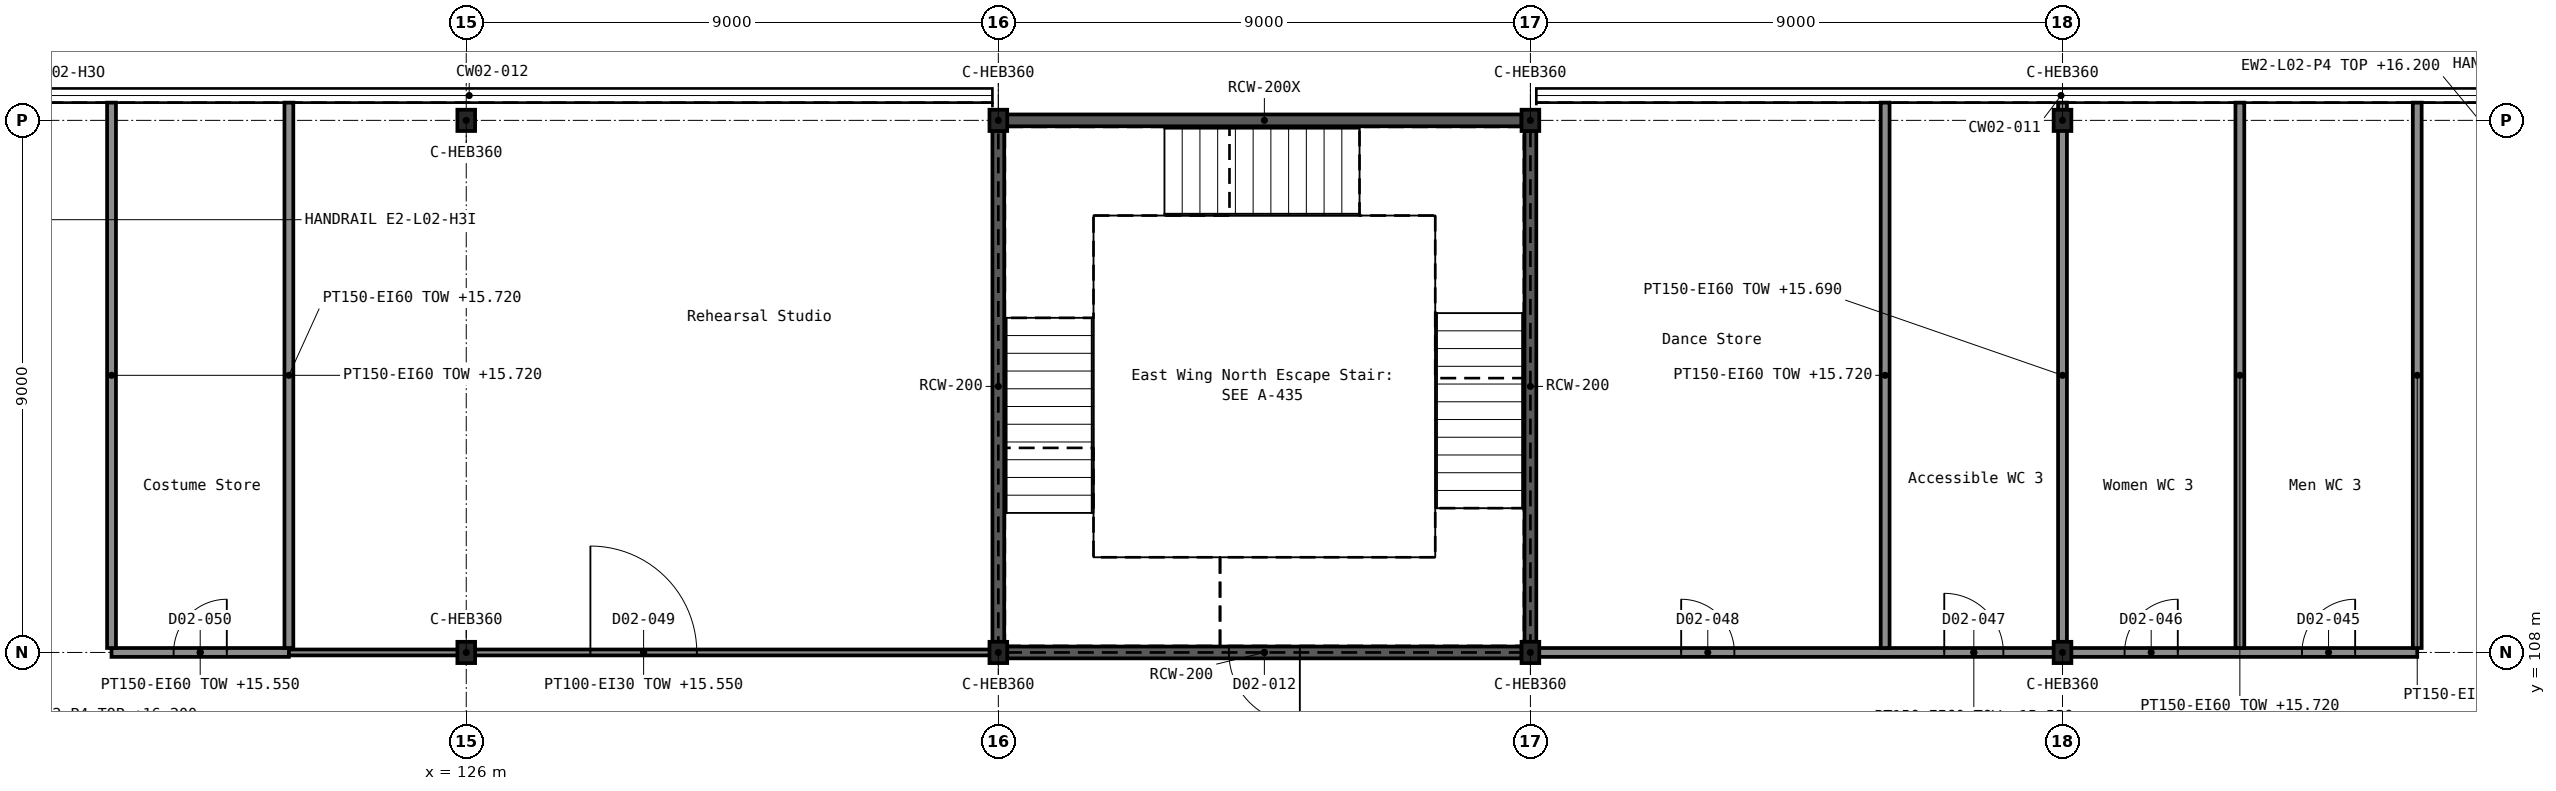
"""IFC4 building model, lengths in metres.
Left out: names, types, materials, properties, quantities, classifications, styles, units other than length and angle.
Written with IfcOpenShell. Run it as: python <this file> out.ifc"""

import sys

from ifc_helpers import new_model, si_unit, direction, frame, frame_2d, origin, origin_2d, place, context, subcontext, project, spatial, rectangle, i_section, extrude, element, fill, save


model = new_model("IFC4")
c1 = context("Model", 3, precision=1e-05, world=origin(), true_north=direction((0.0, 1.0)))
c2 = subcontext(c1, "Body", "Model", "MODEL_VIEW")
j1 = project(units=[si_unit("LENGTHUNIT", "METRE"), si_unit("PLANEANGLEUNIT", "RADIAN")], contexts=[c1])
p1 = place(None, origin())
s1 = spatial("IfcSite", under=j1, at=p1, CompositionType="ELEMENT")
p2 = place(p1, origin())
s2 = spatial("IfcBuilding", under=s1, at=p2, CompositionType="ELEMENT")
p3 = place(p2, frame((0.0, 0.0, 10.8)))
s3 = spatial("IfcBuildingStorey", under=s2, at=p3, CompositionType="ELEMENT", Elevation=10.8)
for number, where, z_axis, x_axis in (
    (1, (126.0, 108.0, 0.0), (0.0, 0.0, 1.0), (1.0, 0.0, 0.0)),
    (2, (135.0, 108.0, 0.0), (0.0, 0.0, 1.0), (1.0, 0.0, 0.0)),
    (3, (144.0, 108.0, 0.0), (0.0, 0.0, 1.0), (1.0, 0.0, 0.0)),
    (4, (153.0, 108.0, 0.0), (0.0, 0.0, 1.0), (1.0, 0.0, 0.0)),
    (5, (126.0, 117.0, 0.0), (0.0, 0.0, 1.0), (1.0, 0.0, 0.0)),
    (6, (135.0, 117.0, 0.0), (0.0, 0.0, 1.0), (1.0, 0.0, 0.0)),
    (7, (144.0, 117.0, 0.0), (0.0, 0.0, 1.0), (1.0, 0.0, 0.0)),
    (8, (153.0, 117.0, 0.0), (0.0, 0.0, 1.0), (1.0, 0.0, 0.0)),
):
    element("IfcColumn", number, at=place(p3, frame(where, z_axis=z_axis, x_axis=x_axis)), inside=s3, PredefinedType="COLUMN", context=c2, shape_type="SweptSolid", body=[
        extrude(i_section(OverallWidth=0.3, OverallDepth=0.36, WebThickness=0.012, FlangeThickness=0.022, FilletRadius=0.027, at=origin_2d()), origin(), (0.0, 0.0, 1.0), 5.4),
    ])
p4 = place(p3, frame((135.15, 108.0, 0.0), z_axis=(0.0, 0.0, 1.0), x_axis=(1.0, 0.0, 0.0)))
e9 = element("IfcWall", 9, at=p4, inside=s3, PredefinedType="SHEAR", context=c2, shape_type="SweptSolid", body=[
    extrude(rectangle(XDim=8.7, YDim=0.2, at=frame_2d((4.35, 0.0))), origin(), (0.0, 0.0, 1.0), 5.4),
])
p5 = place(p4, frame((3.75, 0.0, 0.0)))
e10 = element("IfcOpeningElement", 10, at=p5, cuts=e9, PredefinedType="OPENING", context=c2, shape_type="SweptSolid", body=[
    extrude(rectangle(XDim=1.2, YDim=2.1, at=frame_2d((0.6, 1.05))), frame((0.0, 0.111, 0.0), z_axis=(0.0, -1.0, 0.0), x_axis=(1.0, 0.0, 0.0)), (0.0, 0.0, 1.0), 0.222),
])
p6 = place(p3, frame((135.15, 117.0, 0.0), z_axis=(0.0, 0.0, 1.0), x_axis=(1.0, 0.0, 0.0)))
e11 = element("IfcWall", 11, at=p6, inside=s3, PredefinedType="SHEAR", context=c2, shape_type="SweptSolid", body=[
    extrude(rectangle(XDim=8.7, YDim=0.2, at=frame_2d((4.35, 0.0))), origin(), (0.0, 0.0, 1.0), 5.4),
])
for number, where, z_axis, x_axis in (
    (12, (135.0, 108.18, 0.0), (0.0, 0.0, 1.0), (0.0, 1.0, 0.0)),
    (13, (144.0, 108.18, 0.0), (0.0, 0.0, 1.0), (0.0, 1.0, 0.0)),
):
    element("IfcWall", number, at=place(p3, frame(where, z_axis=z_axis, x_axis=x_axis)), inside=s3, PredefinedType="SHEAR", context=c2, shape_type="SweptSolid", body=[
        extrude(rectangle(XDim=8.64, YDim=0.2, at=frame_2d((4.32, 0.0))), origin(), (0.0, 0.0, 1.0), 5.4),
    ])
p7 = place(p3, frame((120.0, 108.0, 0.0), z_axis=(0.0, 0.0, 1.0), x_axis=(1.0, 0.0, 0.0)))
e14 = element("IfcWall", 14, at=p7, inside=s3, PredefinedType="PARTITIONING", context=c2, shape_type="SweptSolid", body=[
    extrude(rectangle(XDim=3.0, YDim=0.15, at=frame_2d((1.5, 0.0))), origin(), (0.0, 0.0, 1.0), 4.75),
])
p8 = place(p7, frame((1.05, 0.0, 0.0)))
e15 = element("IfcOpeningElement", 15, at=p8, cuts=e14, PredefinedType="OPENING", context=c2, shape_type="SweptSolid", body=[
    extrude(rectangle(XDim=0.9, YDim=2.4, at=frame_2d((0.45, 1.2))), frame((0.0, 0.086, 0.0), z_axis=(0.0, -1.0, 0.0), x_axis=(1.0, 0.0, 0.0)), (0.0, 0.0, 1.0), 0.172),
])
p9 = place(p3, frame((144.0, 108.0, 0.0), z_axis=(0.0, 0.0, 1.0), x_axis=(1.0, 0.0, 0.0)))
e16 = element("IfcWall", 16, at=p9, inside=s3, PredefinedType="PARTITIONING", context=c2, shape_type="SweptSolid", body=[
    extrude(rectangle(XDim=15.0, YDim=0.15, at=frame_2d((7.5, 0.0))), origin(), (0.0, 0.0, 1.0), 4.75),
])
p10 = place(p9, frame((13.05, 0.0, 0.0)))
e17 = element("IfcOpeningElement", 17, at=p10, cuts=e16, PredefinedType="OPENING", context=c2, shape_type="SweptSolid", body=[
    extrude(rectangle(XDim=0.9, YDim=2.1, at=frame_2d((0.45, 1.05))), frame((0.0, 0.086, 0.0), z_axis=(0.0, -1.0, 0.0), x_axis=(1.0, 0.0, 0.0)), (0.0, 0.0, 1.0), 0.172),
])
p11 = place(p9, frame((10.05, 0.0, 0.0)))
e18 = element("IfcOpeningElement", 18, at=p11, cuts=e16, PredefinedType="OPENING", context=c2, shape_type="SweptSolid", body=[
    extrude(rectangle(XDim=0.9, YDim=2.1, at=frame_2d((0.45, 1.05))), frame((0.0, 0.086, 0.0), z_axis=(0.0, -1.0, 0.0), x_axis=(1.0, 0.0, 0.0)), (0.0, 0.0, 1.0), 0.172),
])
p12 = place(p9, frame((7.0, 0.0, 0.0)))
e19 = element("IfcOpeningElement", 19, at=p12, cuts=e16, PredefinedType="OPENING", context=c2, shape_type="SweptSolid", body=[
    extrude(rectangle(XDim=1.0, YDim=2.1, at=frame_2d((0.5, 1.05))), frame((0.0, 0.086, 0.0), z_axis=(0.0, -1.0, 0.0), x_axis=(1.0, 0.0, 0.0)), (0.0, 0.0, 1.0), 0.172),
])
p13 = place(p9, frame((2.55, 0.0, 0.0)))
e20 = element("IfcOpeningElement", 20, at=p13, cuts=e16, PredefinedType="OPENING", context=c2, shape_type="SweptSolid", body=[
    extrude(rectangle(XDim=0.9, YDim=2.4, at=frame_2d((0.45, 1.2))), frame((0.0, 0.086, 0.0), z_axis=(0.0, -1.0, 0.0), x_axis=(1.0, 0.0, 0.0)), (0.0, 0.0, 1.0), 0.172),
])
for number, where, z_axis, x_axis in (
    (21, (120.0, 108.075, 0.0), (0.0, 0.0, 1.0), (0.0, 1.0, 0.0)),
    (22, (123.0, 108.075, 0.0), (0.0, 0.0, 1.0), (0.0, 1.0, 0.0)),
    (23, (150.0, 108.075, 0.0), (0.0, 0.0, 1.0), (0.0, 1.0, 0.0)),
):
    element("IfcWall", number, at=place(p3, frame(where, z_axis=z_axis, x_axis=x_axis)), inside=s3, PredefinedType="PARTITIONING", context=c2, shape_type="SweptSolid", body=[
        extrude(rectangle(XDim=9.225, YDim=0.15, at=frame_2d((4.613, 0.0))), origin(), (0.0, 0.0, 1.0), 4.92),
    ])
p14 = place(p3, frame((153.0, 108.075, 0.0), z_axis=(0.0, 0.0, 1.0), x_axis=(0.0, 1.0, 0.0)))
e24 = element("IfcWall", 24, at=p14, inside=s3, PredefinedType="PARTITIONING", context=c2, shape_type="SweptSolid", body=[
    extrude(rectangle(XDim=9.225, YDim=0.15, at=frame_2d((4.613, 0.0))), origin(), (0.0, 0.0, 1.0), 4.89),
])
for number, where, z_axis, x_axis in (
    (25, (156.0, 108.075, 0.0), (0.0, 0.0, 1.0), (0.0, 1.0, 0.0)),
    (26, (159.0, 108.075, 0.0), (0.0, 0.0, 1.0), (0.0, 1.0, 0.0)),
):
    element("IfcWall", number, at=place(p3, frame(where, z_axis=z_axis, x_axis=x_axis)), inside=s3, PredefinedType="PARTITIONING", context=c2, shape_type="SweptSolid", body=[
        extrude(rectangle(XDim=9.225, YDim=0.15, at=frame_2d((4.613, 0.0))), origin(), (0.0, 0.0, 1.0), 4.92),
    ])
p15 = place(p3, frame((123.0, 108.0, 0.0), z_axis=(0.0, 0.0, 1.0), x_axis=(1.0, 0.0, 0.0)))
e27 = element("IfcWall", 27, at=p15, inside=s3, PredefinedType="PARTITIONING", context=c2, shape_type="SweptSolid", body=[
    extrude(rectangle(XDim=12.0, YDim=0.1, at=frame_2d((6.0, 0.0))), origin(), (0.0, 0.0, 1.0), 4.75),
])
p16 = place(p15, frame((5.1, 0.0, 0.0)))
e28 = element("IfcOpeningElement", 28, at=p16, cuts=e27, PredefinedType="OPENING", context=c2, shape_type="SweptSolid", body=[
    extrude(rectangle(XDim=1.8, YDim=2.1, at=frame_2d((0.9, 1.05))), frame((0.0, 0.061, 0.0), z_axis=(0.0, -1.0, 0.0), x_axis=(1.0, 0.0, 0.0)), (0.0, 0.0, 1.0), 0.122),
])
p17 = place(p5, frame((1.2, 0.0, 0.0), z_axis=(0.0, 0.0, 1.0), x_axis=(-1.0, 0.0, 0.0)))
e29 = element("IfcDoor", 29, at=p17, inside=s3, OperationType="SINGLE_SWING_LEFT", PredefinedType="DOOR", context=c2, shape_type="SweptSolid", body=[
    extrude(rectangle(XDim=1.2, YDim=2.1, at=frame_2d((0.6, 1.05))), frame((0.0, 0.025, 0.0), z_axis=(0.0, -1.0, 0.0), x_axis=(1.0, 0.0, 0.0)), (0.0, 0.0, 1.0), 0.05),
])
fill(e10, e29)
p18 = place(p10, origin())
e30 = element("IfcDoor", 30, at=p18, inside=s3, OperationType="SINGLE_SWING_RIGHT", PredefinedType="DOOR", context=c2, shape_type="SweptSolid", body=[
    extrude(rectangle(XDim=0.9, YDim=2.1, at=frame_2d((0.45, 1.05))), frame((0.0, 0.025, 0.0), z_axis=(0.0, -1.0, 0.0), x_axis=(1.0, 0.0, 0.0)), (0.0, 0.0, 1.0), 0.05),
])
fill(e17, e30)
p19 = place(p11, origin())
e31 = element("IfcDoor", 31, at=p19, inside=s3, OperationType="SINGLE_SWING_RIGHT", PredefinedType="DOOR", context=c2, shape_type="SweptSolid", body=[
    extrude(rectangle(XDim=0.9, YDim=2.1, at=frame_2d((0.45, 1.05))), frame((0.0, 0.025, 0.0), z_axis=(0.0, -1.0, 0.0), x_axis=(1.0, 0.0, 0.0)), (0.0, 0.0, 1.0), 0.05),
])
fill(e18, e31)
p20 = place(p12, origin())
e32 = element("IfcDoor", 32, at=p20, inside=s3, OperationType="SINGLE_SWING_LEFT", PredefinedType="DOOR", context=c2, shape_type="SweptSolid", body=[
    extrude(rectangle(XDim=1.0, YDim=2.1, at=frame_2d((0.5, 1.05))), frame((0.0, 0.025, 0.0), z_axis=(0.0, -1.0, 0.0), x_axis=(1.0, 0.0, 0.0)), (0.0, 0.0, 1.0), 0.05),
])
fill(e19, e32)
p21 = place(p13, origin())
e33 = element("IfcDoor", 33, at=p21, inside=s3, OperationType="SINGLE_SWING_LEFT", PredefinedType="DOOR", context=c2, shape_type="SweptSolid", body=[
    extrude(rectangle(XDim=0.9, YDim=2.4, at=frame_2d((0.45, 1.2))), frame((0.0, 0.025, 0.0), z_axis=(0.0, -1.0, 0.0), x_axis=(1.0, 0.0, 0.0)), (0.0, 0.0, 1.0), 0.05),
])
fill(e20, e33)
p22 = place(p16, origin())
e34 = element("IfcDoor", 34, at=p22, inside=s3, OperationType="DOUBLE_DOOR_SINGLE_SWING", PredefinedType="DOOR", context=c2, shape_type="SweptSolid", body=[
    extrude(rectangle(XDim=1.8, YDim=2.1, at=frame_2d((0.9, 1.05))), frame((0.0, 0.025, 0.0), z_axis=(0.0, -1.0, 0.0), x_axis=(1.0, 0.0, 0.0)), (0.0, 0.0, 1.0), 0.05),
])
fill(e28, e34)
p23 = place(p8, origin())
e35 = element("IfcDoor", 35, at=p23, inside=s3, OperationType="SINGLE_SWING_RIGHT", PredefinedType="DOOR", context=c2, shape_type="SweptSolid", body=[
    extrude(rectangle(XDim=0.9, YDim=2.4, at=frame_2d((0.45, 1.2))), frame((0.0, 0.025, 0.0), z_axis=(0.0, -1.0, 0.0), x_axis=(1.0, 0.0, 0.0)), (0.0, 0.0, 1.0), 0.05),
])
fill(e15, e35)
save(model, sys.argv[1])
